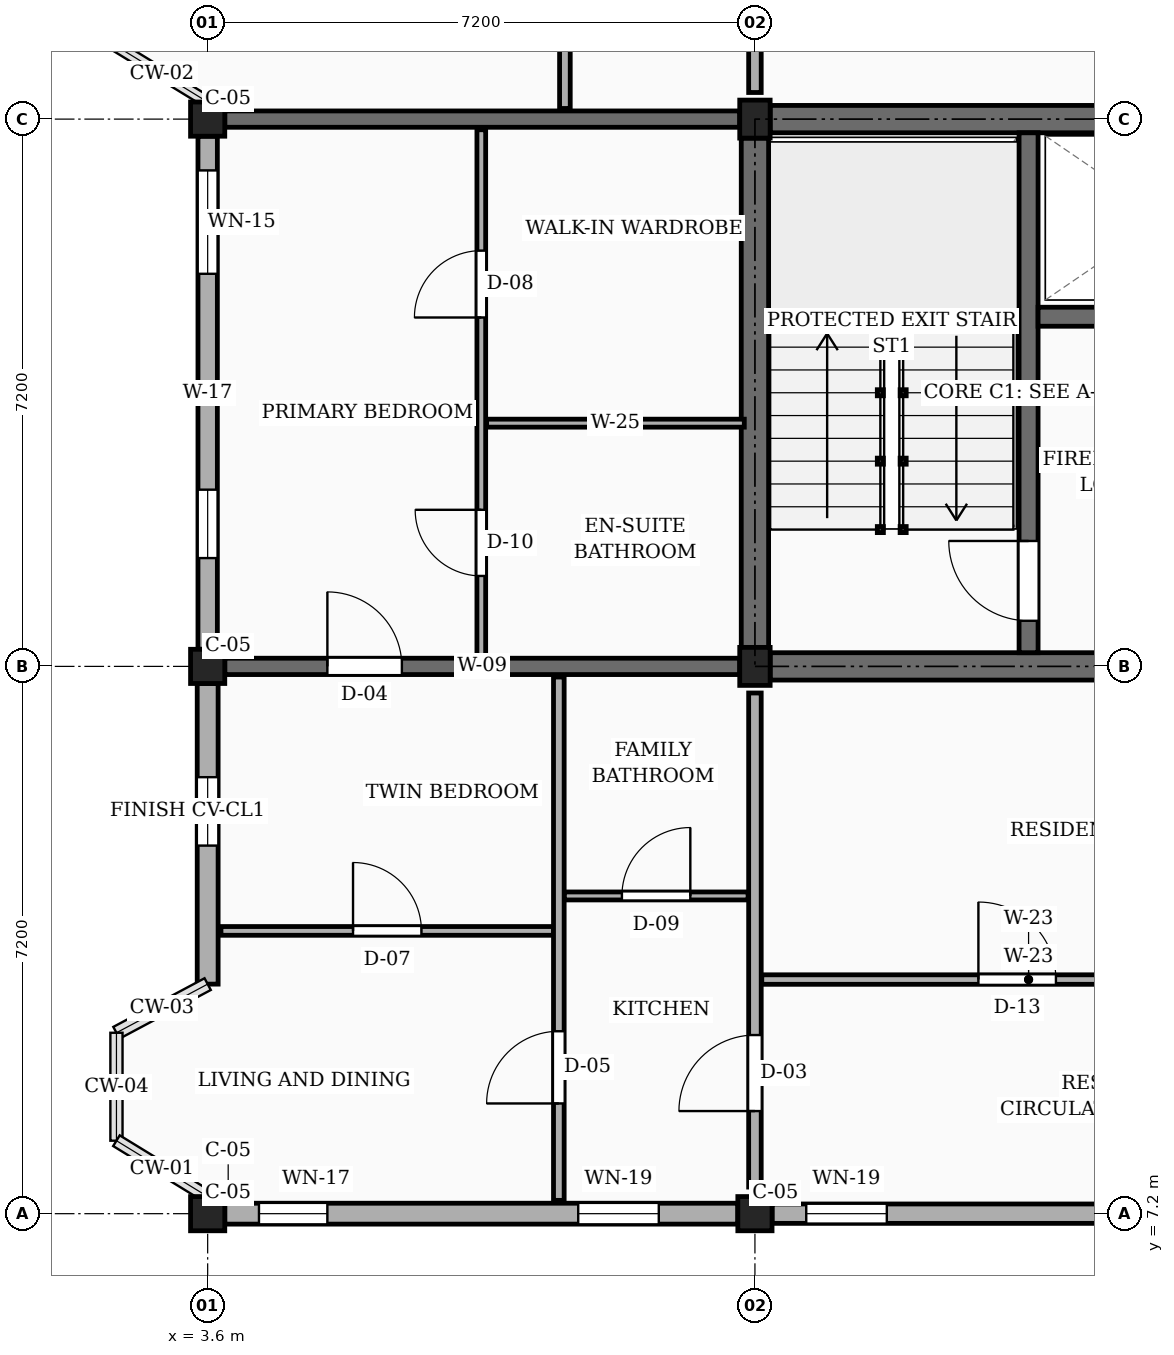
"""IFC4 building model, lengths in metres.
Left out: names, types, materials, properties, quantities, classifications, styles, units other than length and angle.
Written with IfcOpenShell. Run it as: python <this file> out.ifc"""

import sys

from ifc_helpers import new_model, si_unit, direction, frame, frame_2d, origin, origin_2d, place, context, subcontext, project, spatial, rectangle, extrude, element, fill, save


model = new_model("IFC4")
c1 = context("Model", 3, precision=1e-05, world=origin(), true_north=direction((0.0, 1.0)))
c2 = subcontext(c1, "Body", "Model", "MODEL_VIEW")
j1 = project(units=[si_unit("LENGTHUNIT", "METRE"), si_unit("PLANEANGLEUNIT", "RADIAN")], contexts=[c1])
p1 = place(None, origin())
s1 = spatial("IfcSite", under=j1, at=p1, CompositionType="ELEMENT")
p2 = place(p1, origin())
s2 = spatial("IfcBuilding", under=s1, at=p2, CompositionType="ELEMENT")
p3 = place(p2, frame((0.0, 0.0, 36.0)))
s3 = spatial("IfcBuildingStorey", under=s2, at=p3, CompositionType="ELEMENT", Elevation=36.0)
for number, where, z_axis, x_axis in (
    (1, (3.6, 7.2, 0.0), (0.0, 0.0, 1.0), (1.0, 0.0, 0.0)),
    (2, (3.6, 14.4, 0.0), (0.0, 0.0, 1.0), (1.0, 0.0, 0.0)),
    (3, (3.6, 21.6, 0.0), (0.0, 0.0, 1.0), (1.0, 0.0, 0.0)),
    (4, (10.8, 7.2, 0.0), (0.0, 0.0, 1.0), (1.0, 0.0, 0.0)),
):
    element("IfcColumn", number, at=place(p3, frame(where, z_axis=z_axis, x_axis=x_axis)), inside=s3, PredefinedType="COLUMN", context=c2, shape_type="SweptSolid", body=[
        extrude(rectangle(XDim=0.45, YDim=0.45, at=origin_2d()), origin(), (0.0, 0.0, 1.0), 3.15),
    ])
for number, where, z_axis, x_axis in (
    (5, (10.8, 14.4, 0.0), (0.0, 0.0, 1.0), (1.0, 0.0, 0.0)),
    (6, (10.8, 21.6, 0.0), (0.0, 0.0, 1.0), (1.0, 0.0, 0.0)),
):
    element("IfcColumn", number, at=place(p3, frame(where, z_axis=z_axis, x_axis=x_axis)), inside=s3, PredefinedType="COLUMN", context=c2, shape_type="SweptSolid", body=[
        extrude(rectangle(XDim=0.4, YDim=0.5, at=origin_2d()), origin(), (0.0, 0.0, 1.0), 3.15),
    ])
p4 = place(p3, frame((3.825, 14.4, 0.0), z_axis=(0.0, 0.0, 1.0), x_axis=(1.0, 0.0, 0.0)))
e7 = element("IfcWall", 7, at=p4, inside=s3, PredefinedType="SOLIDWALL", context=c2, shape_type="SweptSolid", body=[
    extrude(rectangle(XDim=6.775, YDim=0.215, at=frame_2d((3.388, 0.0))), origin(), (0.0, 0.0, 1.0), 2.17),
])
p5 = place(p4, frame((1.35, 0.0, 0.0)))
e8 = element("IfcOpeningElement", 8, at=p5, cuts=e7, PredefinedType="OPENING", context=c2, shape_type="SweptSolid", body=[
    extrude(rectangle(XDim=0.98, YDim=2.12, at=frame_2d((0.49, 1.06))), frame((0.0, 0.118, 0.0), z_axis=(0.0, -1.0, 0.0), x_axis=(1.0, 0.0, 0.0)), (0.0, 0.0, 1.0), 0.235),
])
p6 = place(p3, frame((3.825, 21.6, 0.0), z_axis=(0.0, 0.0, 1.0), x_axis=(1.0, 0.0, 0.0)))
e9 = element("IfcWall", 9, at=p6, inside=s3, PredefinedType="SOLIDWALL", context=c2, shape_type="SweptSolid", body=[
    extrude(rectangle(XDim=6.775, YDim=0.215, at=frame_2d((3.388, 0.0))), origin(), (0.0, 0.0, 1.0), 2.17),
])
p7 = place(p3, frame((3.825, 7.2, 0.0), z_axis=(0.0, 0.0, 1.0), x_axis=(1.0, 0.0, 0.0)))
e10 = element("IfcWall", 10, at=p7, inside=s3, PredefinedType="SOLIDWALL", context=c2, shape_type="SweptSolid", body=[
    extrude(rectangle(XDim=6.75, YDim=0.275, at=frame_2d((3.375, 0.0))), origin(), (0.0, 0.0, 1.0), 2.44),
])
p8 = place(p7, frame((0.45, 0.0, 0.78)))
e11 = element("IfcOpeningElement", 11, at=p8, cuts=e10, PredefinedType="OPENING", context=c2, shape_type="SweptSolid", body=[
    extrude(rectangle(XDim=0.9, YDim=1.36, at=frame_2d((0.45, 0.68))), frame((0.0, 0.147, 0.0), z_axis=(0.0, -1.0, 0.0), x_axis=(1.0, 0.0, 0.0)), (0.0, 0.0, 1.0), 0.295),
])
p9 = place(p7, frame((4.65, 0.0, 0.78)))
e12 = element("IfcOpeningElement", 12, at=p9, cuts=e10, PredefinedType="OPENING", context=c2, shape_type="SweptSolid", body=[
    extrude(rectangle(XDim=1.06, YDim=1.36, at=frame_2d((0.53, 0.68))), frame((0.0, 0.147, 0.0), z_axis=(0.0, -1.0, 0.0), x_axis=(1.0, 0.0, 0.0)), (0.0, 0.0, 1.0), 0.295),
])
p10 = place(p3, frame((11.025, 7.2, 0.0), z_axis=(0.0, 0.0, 1.0), x_axis=(1.0, 0.0, 0.0)))
e13 = element("IfcWall", 13, at=p10, inside=s3, PredefinedType="SOLIDWALL", context=c2, shape_type="SweptSolid", body=[
    extrude(rectangle(XDim=6.75, YDim=0.255, at=frame_2d((3.375, 0.0))), origin(), (0.0, 0.0, 1.0), 2.44),
])
p11 = place(p10, frame((0.45, 0.0, 0.78)))
e14 = element("IfcOpeningElement", 14, at=p11, cuts=e13, PredefinedType="OPENING", context=c2, shape_type="SweptSolid", body=[
    extrude(rectangle(XDim=1.06, YDim=1.36, at=frame_2d((0.53, 0.68))), frame((0.0, 0.137, 0.0), z_axis=(0.0, -1.0, 0.0), x_axis=(1.0, 0.0, 0.0)), (0.0, 0.0, 1.0), 0.275),
])
p12 = place(p10, frame((4.65, 0.0, 0.78)))
e15 = element("IfcOpeningElement", 15, at=p12, cuts=e13, PredefinedType="OPENING", context=c2, shape_type="SweptSolid", body=[
    extrude(rectangle(XDim=1.22, YDim=1.36, at=frame_2d((0.61, 0.68))), frame((0.0, 0.137, 0.0), z_axis=(0.0, -1.0, 0.0), x_axis=(1.0, 0.0, 0.0)), (0.0, 0.0, 1.0), 0.275),
])
p13 = place(p3, frame((3.6, 21.375, 0.0), z_axis=(0.0, 0.0, 1.0), x_axis=(0.0, -1.0, 0.0)))
e16 = element("IfcWall", 16, at=p13, inside=s3, PredefinedType="SOLIDWALL", context=c2, shape_type="SweptSolid", body=[
    extrude(rectangle(XDim=6.75, YDim=0.255, at=frame_2d((3.375, 0.0))), origin(), (0.0, 0.0, 1.0), 2.44),
])
p14 = place(p13, frame((0.45, 0.0, 0.78)))
e17 = element("IfcOpeningElement", 17, at=p14, cuts=e16, PredefinedType="OPENING", context=c2, shape_type="SweptSolid", body=[
    extrude(rectangle(XDim=1.36, YDim=1.26, at=frame_2d((0.68, 0.63))), frame((0.0, 0.137, 0.0), z_axis=(0.0, -1.0, 0.0), x_axis=(1.0, 0.0, 0.0)), (0.0, 0.0, 1.0), 0.275),
])
p15 = place(p13, frame((4.65, 0.0, 0.78)))
e18 = element("IfcOpeningElement", 18, at=p15, cuts=e16, PredefinedType="OPENING", context=c2, shape_type="SweptSolid", body=[
    extrude(rectangle(XDim=0.9, YDim=1.36, at=frame_2d((0.45, 0.68))), frame((0.0, 0.137, 0.0), z_axis=(0.0, -1.0, 0.0), x_axis=(1.0, 0.0, 0.0)), (0.0, 0.0, 1.0), 0.275),
])
p16 = place(p3, frame((3.6, 14.175, 0.0), z_axis=(0.0, 0.0, 1.0), x_axis=(0.0, -1.0, 0.0)))
e19 = element("IfcWall", 19, at=p16, inside=s3, PredefinedType="SOLIDWALL", context=c2, shape_type="SweptSolid", body=[
    extrude(rectangle(XDim=3.955, YDim=0.275, at=frame_2d((1.978, 0.0))), origin(), (0.0, 0.0, 1.0), 2.44),
])
p17 = place(p16, frame((1.232, 0.0, 0.78)))
e20 = element("IfcOpeningElement", 20, at=p17, cuts=e19, PredefinedType="OPENING", context=c2, shape_type="SweptSolid", body=[
    extrude(rectangle(XDim=0.9, YDim=1.36, at=frame_2d((0.45, 0.68))), frame((0.0, 0.147, 0.0), z_axis=(0.0, -1.0, 0.0), x_axis=(1.0, 0.0, 0.0)), (0.0, 0.0, 1.0), 0.295),
])
p18 = place(p3, frame((10.8, 14.65, 0.0), z_axis=(0.0, 0.0, 1.0), x_axis=(0.0, 1.0, 0.0)))
e21 = element("IfcWall", 21, at=p18, inside=s3, PredefinedType="SHEAR", context=c2, shape_type="SweptSolid", body=[
    extrude(rectangle(XDim=6.7, YDim=0.36, at=frame_2d((3.35, 0.0))), origin(), (0.0, 0.0, 1.0), 2.87),
])
for number, where, z_axis, x_axis in (
    (22, (11.0, 21.6, 0.0), (0.0, 0.0, 1.0), (1.0, 0.0, 0.0)),
    (23, (11.0, 14.4, 0.0), (0.0, 0.0, 1.0), (1.0, 0.0, 0.0)),
):
    element("IfcWall", number, at=place(p3, frame(where, z_axis=z_axis, x_axis=x_axis)), inside=s3, PredefinedType="SHEAR", context=c2, shape_type="SweptSolid", body=[
        extrude(rectangle(XDim=6.8, YDim=0.36, at=frame_2d((3.4, 0.0))), origin(), (0.0, 0.0, 1.0), 2.87),
    ])
p19 = place(p3, frame((14.4, 14.58, 0.0), z_axis=(0.0, 0.0, 1.0), x_axis=(0.0, 1.0, 0.0)))
e24 = element("IfcWall", 24, at=p19, inside=s3, PredefinedType="SHEAR", context=c2, shape_type="SweptSolid", body=[
    extrude(rectangle(XDim=6.84, YDim=0.25, at=frame_2d((3.42, 0.0))), origin(), (0.0, 0.0, 1.0), 2.87),
])
p20 = place(p19, frame((0.42, 0.0, 0.0)))
e25 = element("IfcOpeningElement", 25, at=p20, cuts=e24, PredefinedType="OPENING", context=c2, shape_type="SweptSolid", body=[
    extrude(rectangle(XDim=1.05, YDim=2.15, at=frame_2d((0.525, 1.075))), frame((0.0, 0.135, 0.0), z_axis=(0.0, -1.0, 0.0), x_axis=(1.0, 0.0, 0.0)), (0.0, 0.0, 1.0), 0.27),
])
p21 = place(p3, frame((14.525, 19.0, 0.0), z_axis=(0.0, 0.0, 1.0), x_axis=(1.0, 0.0, 0.0)))
e26 = element("IfcWall", 26, at=p21, inside=s3, PredefinedType="SHEAR", context=c2, shape_type="SweptSolid", body=[
    extrude(rectangle(XDim=3.295, YDim=0.25, at=frame_2d((1.647, 0.0))), origin(), (0.0, 0.0, 1.0), 2.87),
])
p22 = place(p21, frame((1.1, 0.0, 0.0)))
e27 = element("IfcOpeningElement", 27, at=p22, cuts=e26, PredefinedType="OPENING", context=c2, shape_type="SweptSolid", body=[
    extrude(rectangle(XDim=1.1, YDim=2.2, at=frame_2d((0.55, 1.1))), frame((0.0, 0.135, 0.0), z_axis=(0.0, -1.0, 0.0), x_axis=(1.0, 0.0, 0.0)), (0.0, 0.0, 1.0), 0.27),
])
p23 = place(p3, frame((10.8, 7.55, 0.0), z_axis=(0.0, 0.0, 1.0), x_axis=(0.0, 1.0, 0.0)))
e28 = element("IfcWall", 28, at=p23, inside=s3, PredefinedType="PARTITIONING", context=c2, shape_type="SweptSolid", body=[
    extrude(rectangle(XDim=6.5, YDim=0.165, at=frame_2d((3.25, 0.0))), origin(), (0.0, 0.0, 1.0), 2.305),
])
p24 = place(p23, frame((1.0, 0.0, 0.0)))
e29 = element("IfcOpeningElement", 29, at=p24, cuts=e28, PredefinedType="OPENING", context=c2, shape_type="SweptSolid", body=[
    extrude(rectangle(XDim=1.0, YDim=2.15, at=frame_2d((0.5, 1.075))), frame((0.0, 0.093, 0.0), z_axis=(0.0, -1.0, 0.0), x_axis=(1.0, 0.0, 0.0)), (0.0, 0.0, 1.0), 0.185),
])
p25 = place(p3, frame((10.8, 21.95, 0.0), z_axis=(0.0, 0.0, 1.0), x_axis=(0.0, 1.0, 0.0)))
e30 = element("IfcWall", 30, at=p25, inside=s3, PredefinedType="PARTITIONING", context=c2, shape_type="SweptSolid", body=[
    extrude(rectangle(XDim=6.5, YDim=0.165, at=frame_2d((3.25, 0.0))), origin(), (0.0, 0.0, 1.0), 2.305),
])
p26 = place(p25, frame((1.0, 0.0, 0.0)))
e31 = element("IfcOpeningElement", 31, at=p26, cuts=e30, PredefinedType="OPENING", context=c2, shape_type="SweptSolid", body=[
    extrude(rectangle(XDim=0.94, YDim=2.12, at=frame_2d((0.47, 1.06))), frame((0.0, 0.093, 0.0), z_axis=(0.0, -1.0, 0.0), x_axis=(1.0, 0.0, 0.0)), (0.0, 0.0, 1.0), 0.185),
])
p27 = place(p3, frame((10.89, 10.28, 0.0), z_axis=(0.0, 0.0, 1.0), x_axis=(1.0, 0.0, 0.0)))
e32 = element("IfcWall", 32, at=p27, inside=s3, PredefinedType="PARTITIONING", context=c2, shape_type="SweptSolid", body=[
    extrude(rectangle(XDim=7.02, YDim=0.125, at=frame_2d((3.51, 0.0))), origin(), (0.0, 0.0, 1.0), 2.305),
])
p28 = place(p27, frame((2.85, 0.0, 0.0)))
e33 = element("IfcOpeningElement", 33, at=p28, cuts=e32, PredefinedType="OPENING", context=c2, shape_type="SweptSolid", body=[
    extrude(rectangle(XDim=1.02, YDim=2.15, at=frame_2d((0.51, 1.075))), frame((0.0, 0.073, 0.0), z_axis=(0.0, -1.0, 0.0), x_axis=(1.0, 0.0, 0.0)), (0.0, 0.0, 1.0), 0.145),
])
p29 = place(p3, frame((3.775, 10.92, 0.0), z_axis=(0.0, 0.0, 1.0), x_axis=(1.0, 0.0, 0.0)))
e34 = element("IfcWall", 34, at=p29, inside=s3, PredefinedType="PARTITIONING", context=c2, shape_type="SweptSolid", body=[
    extrude(rectangle(XDim=4.375, YDim=0.115, at=frame_2d((2.188, 0.0))), origin(), (0.0, 0.0, 1.0), 2.305),
])
p30 = place(p29, frame((1.738, 0.0, 0.0)))
e35 = element("IfcOpeningElement", 35, at=p30, cuts=e34, PredefinedType="OPENING", context=c2, shape_type="SweptSolid", body=[
    extrude(rectangle(XDim=0.9, YDim=2.1, at=frame_2d((0.45, 1.05))), frame((0.0, 0.067, 0.0), z_axis=(0.0, -1.0, 0.0), x_axis=(1.0, 0.0, 0.0)), (0.0, 0.0, 1.0), 0.135),
])
p31 = place(p3, frame((8.29, 11.38, 0.0), z_axis=(0.0, 0.0, 1.0), x_axis=(1.0, 0.0, 0.0)))
e36 = element("IfcWall", 36, at=p31, inside=s3, PredefinedType="PARTITIONING", context=c2, shape_type="SweptSolid", body=[
    extrude(rectangle(XDim=2.42, YDim=0.105, at=frame_2d((1.21, 0.0))), origin(), (0.0, 0.0, 1.0), 2.305),
])
p32 = place(p31, frame((0.76, 0.0, 0.0)))
e37 = element("IfcOpeningElement", 37, at=p32, cuts=e36, PredefinedType="OPENING", context=c2, shape_type="SweptSolid", body=[
    extrude(rectangle(XDim=0.9, YDim=2.05, at=frame_2d((0.45, 1.025))), frame((0.0, 0.062, 0.0), z_axis=(0.0, -1.0, 0.0), x_axis=(1.0, 0.0, 0.0)), (0.0, 0.0, 1.0), 0.125),
])
p33 = place(p3, frame((8.22, 7.375, 0.0), z_axis=(0.0, 0.0, 1.0), x_axis=(0.0, 1.0, 0.0)))
e38 = element("IfcWall", 38, at=p33, inside=s3, PredefinedType="PARTITIONING", context=c2, shape_type="SweptSolid", body=[
    extrude(rectangle(XDim=6.885, YDim=0.14, at=frame_2d((3.442, 0.0))), origin(), (0.0, 0.0, 1.0), 2.305),
])
p34 = place(p33, frame((1.275, 0.0, 0.0)))
e39 = element("IfcOpeningElement", 39, at=p34, cuts=e38, PredefinedType="OPENING", context=c2, shape_type="SweptSolid", body=[
    extrude(rectangle(XDim=0.95, YDim=2.1, at=frame_2d((0.475, 1.05))), frame((0.0, 0.08, 0.0), z_axis=(0.0, -1.0, 0.0), x_axis=(1.0, 0.0, 0.0)), (0.0, 0.0, 1.0), 0.16),
])
p35 = place(p3, frame((7.2, 14.54, 0.0), z_axis=(0.0, 0.0, 1.0), x_axis=(0.0, 1.0, 0.0)))
e40 = element("IfcWall", 40, at=p35, inside=s3, PredefinedType="PARTITIONING", context=c2, shape_type="SweptSolid", body=[
    extrude(rectangle(XDim=6.92, YDim=0.115, at=frame_2d((3.46, 0.0))), origin(), (0.0, 0.0, 1.0), 2.305),
])
p36 = place(p35, frame((1.05, 0.0, 0.0)))
e41 = element("IfcOpeningElement", 41, at=p36, cuts=e40, PredefinedType="OPENING", context=c2, shape_type="SweptSolid", body=[
    extrude(rectangle(XDim=0.87, YDim=2.05, at=frame_2d((0.435, 1.025))), frame((0.0, 0.067, 0.0), z_axis=(0.0, -1.0, 0.0), x_axis=(1.0, 0.0, 0.0)), (0.0, 0.0, 1.0), 0.135),
])
p37 = place(p35, frame((4.45, 0.0, 0.0)))
e42 = element("IfcOpeningElement", 42, at=p37, cuts=e40, PredefinedType="OPENING", context=c2, shape_type="SweptSolid", body=[
    extrude(rectangle(XDim=0.88, YDim=2.08, at=frame_2d((0.44, 1.04))), frame((0.0, 0.067, 0.0), z_axis=(0.0, -1.0, 0.0), x_axis=(1.0, 0.0, 0.0)), (0.0, 0.0, 1.0), 0.135),
])
p38 = place(p3, frame((7.27, 17.6, 0.0), z_axis=(0.0, 0.0, 1.0), x_axis=(1.0, 0.0, 0.0)))
e43 = element("IfcWall", 43, at=p38, inside=s3, PredefinedType="PARTITIONING", context=c2, shape_type="SweptSolid", body=[
    extrude(rectangle(XDim=3.39, YDim=0.105, at=frame_2d((1.695, 0.0))), origin(), (0.0, 0.0, 1.0), 2.305),
])
p39 = place(p3, frame((8.3, 21.74, 0.0), z_axis=(0.0, 0.0, 1.0), x_axis=(0.0, 1.0, 0.0)))
e44 = element("IfcWall", 44, at=p39, inside=s3, PredefinedType="PARTITIONING", context=c2, shape_type="SweptSolid", body=[
    extrude(rectangle(XDim=6.92, YDim=0.14, at=frame_2d((3.46, 0.0))), origin(), (0.0, 0.0, 1.0), 2.305),
])
p40 = place(p39, frame((1.31, 0.0, 0.0)))
e45 = element("IfcOpeningElement", 45, at=p40, cuts=e44, PredefinedType="OPENING", context=c2, shape_type="SweptSolid", body=[
    extrude(rectangle(XDim=0.95, YDim=2.1, at=frame_2d((0.475, 1.05))), frame((0.0, 0.08, 0.0), z_axis=(0.0, -1.0, 0.0), x_axis=(1.0, 0.0, 0.0)), (0.0, 0.0, 1.0), 0.16),
])
p41 = place(p8, origin())
e46 = element("IfcWindow", 46, at=p41, inside=s3, PartitioningType="SINGLE_PANEL", PredefinedType="WINDOW", context=c2, shape_type="SweptSolid", body=[
    extrude(rectangle(XDim=0.9, YDim=1.36, at=frame_2d((0.45, 0.68))), frame((0.0, 0.03, 0.0), z_axis=(0.0, -1.0, 0.0), x_axis=(1.0, 0.0, 0.0)), (0.0, 0.0, 1.0), 0.06),
])
fill(e11, e46)
p42 = place(p9, origin())
e47 = element("IfcWindow", 47, at=p42, inside=s3, PartitioningType="SINGLE_PANEL", PredefinedType="WINDOW", context=c2, shape_type="SweptSolid", body=[
    extrude(rectangle(XDim=1.06, YDim=1.36, at=frame_2d((0.53, 0.68))), frame((0.0, 0.03, 0.0), z_axis=(0.0, -1.0, 0.0), x_axis=(1.0, 0.0, 0.0)), (0.0, 0.0, 1.0), 0.06),
])
fill(e12, e47)
p43 = place(p11, origin())
e48 = element("IfcWindow", 48, at=p43, inside=s3, PartitioningType="SINGLE_PANEL", PredefinedType="WINDOW", context=c2, shape_type="SweptSolid", body=[
    extrude(rectangle(XDim=1.06, YDim=1.36, at=frame_2d((0.53, 0.68))), frame((0.0, 0.03, 0.0), z_axis=(0.0, -1.0, 0.0), x_axis=(1.0, 0.0, 0.0)), (0.0, 0.0, 1.0), 0.06),
])
fill(e14, e48)
p44 = place(p14, origin())
e49 = element("IfcWindow", 49, at=p44, inside=s3, PartitioningType="SINGLE_PANEL", PredefinedType="WINDOW", context=c2, shape_type="SweptSolid", body=[
    extrude(rectangle(XDim=1.36, YDim=1.26, at=frame_2d((0.68, 0.63))), frame((0.0, 0.03, 0.0), z_axis=(0.0, -1.0, 0.0), x_axis=(1.0, 0.0, 0.0)), (0.0, 0.0, 1.0), 0.06),
])
fill(e17, e49)
p45 = place(p15, origin())
e50 = element("IfcWindow", 50, at=p45, inside=s3, PartitioningType="SINGLE_PANEL", PredefinedType="WINDOW", context=c2, shape_type="SweptSolid", body=[
    extrude(rectangle(XDim=0.9, YDim=1.36, at=frame_2d((0.45, 0.68))), frame((0.0, 0.03, 0.0), z_axis=(0.0, -1.0, 0.0), x_axis=(1.0, 0.0, 0.0)), (0.0, 0.0, 1.0), 0.06),
])
fill(e18, e50)
p46 = place(p17, origin())
e51 = element("IfcWindow", 51, at=p46, inside=s3, PartitioningType="SINGLE_PANEL", PredefinedType="WINDOW", context=c2, shape_type="SweptSolid", body=[
    extrude(rectangle(XDim=0.9, YDim=1.36, at=frame_2d((0.45, 0.68))), frame((0.0, 0.03, 0.0), z_axis=(0.0, -1.0, 0.0), x_axis=(1.0, 0.0, 0.0)), (0.0, 0.0, 1.0), 0.06),
])
fill(e20, e51)
p47 = place(p20, origin())
e52 = element("IfcDoor", 52, at=p47, inside=s3, OperationType="SINGLE_SWING_RIGHT", PredefinedType="DOOR", context=c2, shape_type="SweptSolid", body=[
    extrude(rectangle(XDim=1.05, YDim=2.15, at=frame_2d((0.525, 1.075))), frame((0.0, 0.025, 0.0), z_axis=(0.0, -1.0, 0.0), x_axis=(1.0, 0.0, 0.0)), (0.0, 0.0, 1.0), 0.05),
])
fill(e25, e52)
p48 = place(p24, origin())
e53 = element("IfcDoor", 53, at=p48, inside=s3, OperationType="SINGLE_SWING_LEFT", PredefinedType="DOOR", context=c2, shape_type="SweptSolid", body=[
    extrude(rectangle(XDim=1.0, YDim=2.15, at=frame_2d((0.5, 1.075))), frame((0.0, 0.025, 0.0), z_axis=(0.0, -1.0, 0.0), x_axis=(1.0, 0.0, 0.0)), (0.0, 0.0, 1.0), 0.05),
])
fill(e29, e53)
p49 = place(p28, origin())
e54 = element("IfcDoor", 54, at=p49, inside=s3, OperationType="SINGLE_SWING_LEFT", PredefinedType="DOOR", context=c2, shape_type="SweptSolid", body=[
    extrude(rectangle(XDim=1.02, YDim=2.15, at=frame_2d((0.51, 1.075))), frame((0.0, 0.025, 0.0), z_axis=(0.0, -1.0, 0.0), x_axis=(1.0, 0.0, 0.0)), (0.0, 0.0, 1.0), 0.05),
])
fill(e33, e54)
p50 = place(p30, origin())
e55 = element("IfcDoor", 55, at=p50, inside=s3, OperationType="SINGLE_SWING_LEFT", PredefinedType="DOOR", context=c2, shape_type="SweptSolid", body=[
    extrude(rectangle(XDim=0.9, YDim=2.1, at=frame_2d((0.45, 1.05))), frame((0.0, 0.025, 0.0), z_axis=(0.0, -1.0, 0.0), x_axis=(1.0, 0.0, 0.0)), (0.0, 0.0, 1.0), 0.05),
])
fill(e35, e55)
p51 = place(p32, origin())
e56 = element("IfcDoor", 56, at=p51, inside=s3, OperationType="SINGLE_SWING_RIGHT", PredefinedType="DOOR", context=c2, shape_type="SweptSolid", body=[
    extrude(rectangle(XDim=0.9, YDim=2.05, at=frame_2d((0.45, 1.025))), frame((0.0, 0.025, 0.0), z_axis=(0.0, -1.0, 0.0), x_axis=(1.0, 0.0, 0.0)), (0.0, 0.0, 1.0), 0.05),
])
fill(e37, e56)
p52 = place(p34, origin())
e57 = element("IfcDoor", 57, at=p52, inside=s3, OperationType="SINGLE_SWING_LEFT", PredefinedType="DOOR", context=c2, shape_type="SweptSolid", body=[
    extrude(rectangle(XDim=0.95, YDim=2.1, at=frame_2d((0.475, 1.05))), frame((0.0, 0.025, 0.0), z_axis=(0.0, -1.0, 0.0), x_axis=(1.0, 0.0, 0.0)), (0.0, 0.0, 1.0), 0.05),
])
fill(e39, e57)
p53 = place(p36, origin())
e58 = element("IfcDoor", 58, at=p53, inside=s3, OperationType="SINGLE_SWING_RIGHT", PredefinedType="DOOR", context=c2, shape_type="SweptSolid", body=[
    extrude(rectangle(XDim=0.87, YDim=2.05, at=frame_2d((0.435, 1.025))), frame((0.0, 0.025, 0.0), z_axis=(0.0, -1.0, 0.0), x_axis=(1.0, 0.0, 0.0)), (0.0, 0.0, 1.0), 0.05),
])
fill(e41, e58)
p54 = place(p37, origin())
e59 = element("IfcDoor", 59, at=p54, inside=s3, OperationType="SINGLE_SWING_LEFT", PredefinedType="DOOR", context=c2, shape_type="SweptSolid", body=[
    extrude(rectangle(XDim=0.88, YDim=2.08, at=frame_2d((0.44, 1.04))), frame((0.0, 0.025, 0.0), z_axis=(0.0, -1.0, 0.0), x_axis=(1.0, 0.0, 0.0)), (0.0, 0.0, 1.0), 0.05),
])
fill(e42, e59)
p55 = place(p5, origin())
e60 = element("IfcDoor", 60, at=p55, inside=s3, OperationType="SINGLE_SWING_LEFT", PredefinedType="DOOR", context=c2, shape_type="SweptSolid", body=[
    extrude(rectangle(XDim=0.98, YDim=2.12, at=frame_2d((0.49, 1.06))), frame((0.0, 0.025, 0.0), z_axis=(0.0, -1.0, 0.0), x_axis=(1.0, 0.0, 0.0)), (0.0, 0.0, 1.0), 0.05),
])
fill(e8, e60)
save(model, sys.argv[1])
